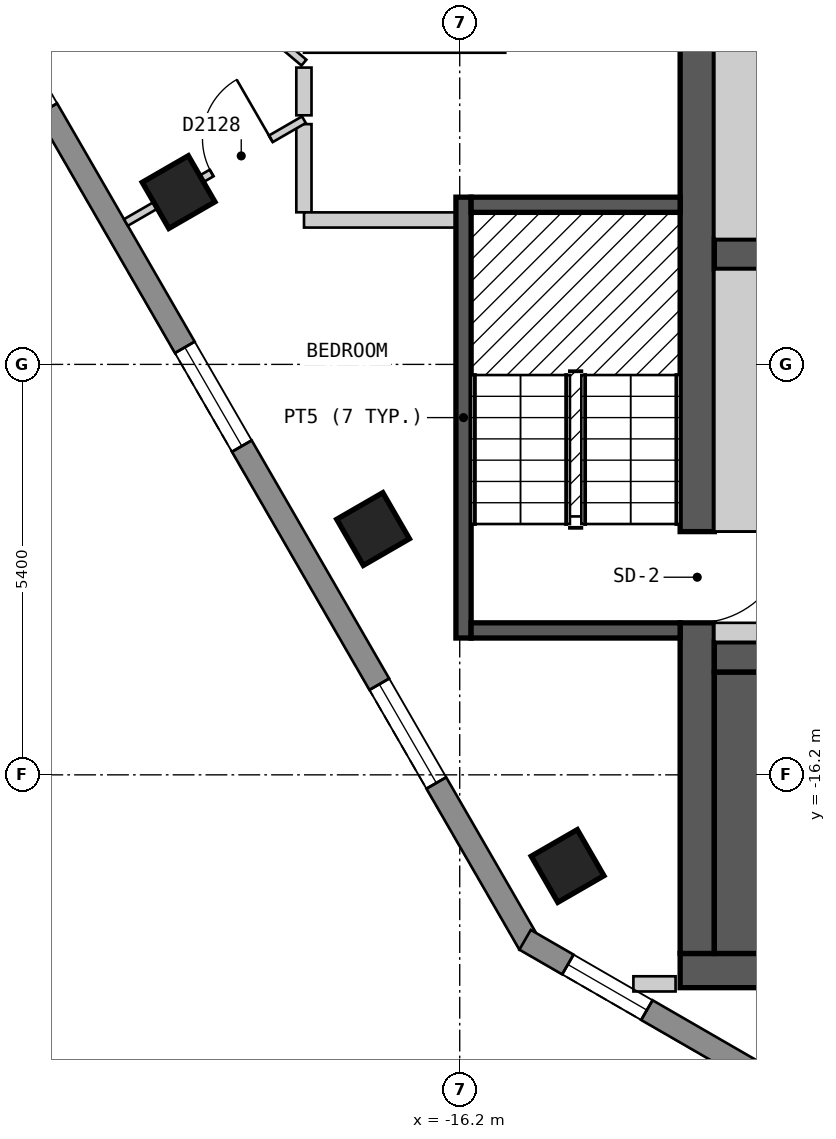
"""IFC4 building model, lengths in metres.
Left out: names, types, materials, properties, quantities, classifications, styles, units other than length and angle.
Written with IfcOpenShell. Run it as: python <this file> out.ifc"""

import sys

from ifc_helpers import new_model, si_unit, direction, frame, frame_2d, origin, origin_2d, place, context, subcontext, project, spatial, polyline, rectangle, outline, extrude, element, fill, save


model = new_model("IFC4")
c1 = context("Model", 3, precision=1e-05, world=origin(), true_north=direction((0.0, 1.0)))
c2 = subcontext(c1, "Body", "Model", "MODEL_VIEW")
j1 = project(units=[si_unit("LENGTHUNIT", "METRE"), si_unit("PLANEANGLEUNIT", "RADIAN")], contexts=[c1])
p1 = place(None, origin())
s1 = spatial("IfcSite", under=j1, at=p1, CompositionType="ELEMENT")
p2 = place(p1, origin())
s2 = spatial("IfcBuilding", under=s1, at=p2, CompositionType="ELEMENT")
p3 = place(p2, frame((0.0, 0.0, 205.8)))
s3 = spatial("IfcBuildingStorey", under=s2, at=p3, CompositionType="ELEMENT", Elevation=205.8)
for number, where, z_axis, x_axis in (
    (1, (-19.899, -8.533, 0.0), (0.0, 0.0, 1.0), (0.5, -0.866, 0.0)),
    (2, (-17.34, -12.966, 0.0), (0.0, 0.0, 1.0), (0.5, -0.866, 0.0)),
    (3, (-14.781, -17.399, 0.0), (0.0, 0.0, 1.0), (0.5, -0.866, 0.0)),
):
    element("IfcColumn", number, at=place(p3, frame(where, z_axis=z_axis, x_axis=x_axis)), inside=s3, PredefinedType="COLUMN", context=c2, shape_type="SweptSolid", body=[
        extrude(rectangle(XDim=0.7, YDim=0.7, at=origin_2d()), origin(), (0.0, 0.0, 1.0), 3.0),
    ])
p4 = place(p3, frame((-13.3, -18.775, 0.0), z_axis=(0.0, 0.0, 1.0), x_axis=(1.0, 0.0, 0.0)))
e4 = element("IfcWall", 4, at=p4, inside=s3, PredefinedType="SHEAR", context=c2, shape_type="SweptSolid", body=[
    extrude(rectangle(XDim=26.6, YDim=0.45, at=frame_2d((13.3, 0.0))), origin(), (0.0, 0.0, 1.0), 2.7),
])
p5 = place(p4, frame((9.8, 0.0, 0.0)))
e5 = element("IfcOpeningElement", 5, at=p5, cuts=e4, PredefinedType="OPENING", context=c2, shape_type="SweptSolid", body=[
    extrude(rectangle(XDim=0.9, YDim=2.1, at=frame_2d((0.45, 1.05))), frame((0.0, 0.235, 0.0), z_axis=(0.0, -1.0, 0.0), x_axis=(1.0, 0.0, 0.0)), (0.0, 0.0, 1.0), 0.47),
])
p6 = place(p3, frame((-13.075, -18.55, 0.0), z_axis=(0.0, 0.0, 1.0), x_axis=(0.0, 1.0, 0.0)))
e6 = element("IfcWall", 6, at=p6, inside=s3, PredefinedType="SHEAR", context=c2, shape_type="SweptSolid", body=[
    extrude(rectangle(XDim=13.1, YDim=0.45, at=frame_2d((6.55, 0.0))), origin(), (0.0, 0.0, 1.0), 2.7),
])
p7 = place(p6, frame((4.35, 0.0, 0.0)))
e7 = element("IfcOpeningElement", 7, at=p7, cuts=e6, PredefinedType="OPENING", context=c2, shape_type="SweptSolid", body=[
    extrude(rectangle(XDim=1.2, YDim=2.1, at=frame_2d((0.6, 1.05))), frame((0.0, 0.235, 0.0), z_axis=(0.0, -1.0, 0.0), x_axis=(1.0, 0.0, 0.0)), (0.0, 0.0, 1.0), 0.47),
])
p8 = place(p3, frame((-12.85, -14.65, 0.0), z_axis=(0.0, 0.0, 1.0), x_axis=(1.0, 0.0, 0.0)))
e8 = element("IfcWall", 8, at=p8, inside=s3, PredefinedType="SHEAR", context=c2, shape_type="SweptSolid", body=[
    extrude(rectangle(XDim=25.7, YDim=0.4, at=frame_2d((12.85, 0.0))), origin(), (0.0, 0.0, 1.0), 2.7),
])
p9 = place(p8, frame((2.05, 0.0, 0.0), z_axis=(0.0, 0.0, 1.0), x_axis=(-1.0, 0.0, 0.0)))
e9 = element("IfcOpeningElement", 9, at=p9, cuts=e8, PredefinedType="OPENING", context=c2, shape_type="SweptSolid", body=[
    extrude(rectangle(XDim=1.2, YDim=2.1, at=frame_2d((0.6, 1.05))), frame((0.0, 0.21, 0.0), z_axis=(0.0, -1.0, 0.0), x_axis=(1.0, 0.0, 0.0)), (0.0, 0.0, 1.0), 0.42),
])
p10 = place(p8, frame((24.9, 0.0, 0.0), z_axis=(0.0, 0.0, 1.0), x_axis=(-1.0, 0.0, 0.0)))
e10 = element("IfcOpeningElement", 10, at=p10, cuts=e8, PredefinedType="OPENING", context=c2, shape_type="SweptSolid", body=[
    extrude(rectangle(XDim=1.2, YDim=2.1, at=frame_2d((0.6, 1.05))), frame((0.0, 0.21, 0.0), z_axis=(0.0, -1.0, 0.0), x_axis=(1.0, 0.0, 0.0)), (0.0, 0.0, 1.0), 0.42),
])
p11 = place(p8, frame((7.95, 0.0, 0.0), z_axis=(0.0, 0.0, 1.0), x_axis=(-1.0, 0.0, 0.0)))
e11 = element("IfcOpeningElement", 11, at=p11, cuts=e8, PredefinedType="OPENING", context=c2, shape_type="SweptSolid", body=[
    extrude(rectangle(XDim=0.9, YDim=2.1, at=frame_2d((0.45, 1.05))), frame((0.0, 0.21, 0.0), z_axis=(0.0, -1.0, 0.0), x_axis=(1.0, 0.0, 0.0)), (0.0, 0.0, 1.0), 0.42),
])
p12 = place(p8, frame((10.0, 0.0, 0.0), z_axis=(0.0, 0.0, 1.0), x_axis=(-1.0, 0.0, 0.0)))
e12 = element("IfcOpeningElement", 12, at=p12, cuts=e8, PredefinedType="OPENING", context=c2, shape_type="SweptSolid", body=[
    extrude(rectangle(XDim=0.9, YDim=2.1, at=frame_2d((0.45, 1.05))), frame((0.0, 0.21, 0.0), z_axis=(0.0, -1.0, 0.0), x_axis=(1.0, 0.0, 0.0)), (0.0, 0.0, 1.0), 0.42),
])
p13 = place(p8, frame((12.3, 0.0, 0.0), z_axis=(0.0, 0.0, 1.0), x_axis=(-1.0, 0.0, 0.0)))
e13 = element("IfcOpeningElement", 13, at=p13, cuts=e8, PredefinedType="OPENING", context=c2, shape_type="SweptSolid", body=[
    extrude(rectangle(XDim=1.0, YDim=2.1, at=frame_2d((0.5, 1.05))), frame((0.0, 0.21, 0.0), z_axis=(0.0, -1.0, 0.0), x_axis=(1.0, 0.0, 0.0)), (0.0, 0.0, 1.0), 0.42),
])
p14 = place(p8, frame((14.5, 0.0, 0.0), z_axis=(0.0, 0.0, 1.0), x_axis=(-1.0, 0.0, 0.0)))
e14 = element("IfcOpeningElement", 14, at=p14, cuts=e8, PredefinedType="OPENING", context=c2, shape_type="SweptSolid", body=[
    extrude(rectangle(XDim=0.9, YDim=2.1, at=frame_2d((0.45, 1.05))), frame((0.0, 0.21, 0.0), z_axis=(0.0, -1.0, 0.0), x_axis=(1.0, 0.0, 0.0)), (0.0, 0.0, 1.0), 0.42),
])
p15 = place(p8, frame((16.5, 0.0, 0.0), z_axis=(0.0, 0.0, 1.0), x_axis=(-1.0, 0.0, 0.0)))
e15 = element("IfcOpeningElement", 15, at=p15, cuts=e8, PredefinedType="OPENING", context=c2, shape_type="SweptSolid", body=[
    extrude(rectangle(XDim=0.9, YDim=2.1, at=frame_2d((0.45, 1.05))), frame((0.0, 0.21, 0.0), z_axis=(0.0, -1.0, 0.0), x_axis=(1.0, 0.0, 0.0)), (0.0, 0.0, 1.0), 0.42),
])
p16 = place(p8, frame((18.65, 0.0, 0.0), z_axis=(0.0, 0.0, 1.0), x_axis=(-1.0, 0.0, 0.0)))
e16 = element("IfcOpeningElement", 16, at=p16, cuts=e8, PredefinedType="OPENING", context=c2, shape_type="SweptSolid", body=[
    extrude(rectangle(XDim=1.0, YDim=2.1, at=frame_2d((0.5, 1.05))), frame((0.0, 0.21, 0.0), z_axis=(0.0, -1.0, 0.0), x_axis=(1.0, 0.0, 0.0)), (0.0, 0.0, 1.0), 0.42),
])
p17 = place(p3, frame((-12.85, -9.35, 0.0), z_axis=(0.0, 0.0, 1.0), x_axis=(1.0, 0.0, 0.0)))
e17 = element("IfcWall", 17, at=p17, inside=s3, PredefinedType="SHEAR", context=c2, shape_type="SweptSolid", body=[
    extrude(rectangle(XDim=23.05, YDim=0.4, at=frame_2d((11.525, 0.0))), origin(), (0.0, 0.0, 1.0), 2.7),
])
p18 = place(p17, frame((1.45, 0.0, 0.0)))
e18 = element("IfcOpeningElement", 18, at=p18, cuts=e17, PredefinedType="OPENING", context=c2, shape_type="SweptSolid", body=[
    extrude(rectangle(XDim=1.1, YDim=2.1, at=frame_2d((0.55, 1.05))), frame((0.0, 0.21, 0.0), z_axis=(0.0, -1.0, 0.0), x_axis=(1.0, 0.0, 0.0)), (0.0, 0.0, 1.0), 0.42),
])
p19 = place(p17, frame((4.25, 0.0, 0.0)))
e19 = element("IfcOpeningElement", 19, at=p19, cuts=e17, PredefinedType="OPENING", context=c2, shape_type="SweptSolid", body=[
    extrude(rectangle(XDim=1.1, YDim=2.1, at=frame_2d((0.55, 1.05))), frame((0.0, 0.21, 0.0), z_axis=(0.0, -1.0, 0.0), x_axis=(1.0, 0.0, 0.0)), (0.0, 0.0, 1.0), 0.42),
])
p20 = place(p17, frame((7.05, 0.0, 0.0)))
e20 = element("IfcOpeningElement", 20, at=p20, cuts=e17, PredefinedType="OPENING", context=c2, shape_type="SweptSolid", body=[
    extrude(rectangle(XDim=1.1, YDim=2.1, at=frame_2d((0.55, 1.05))), frame((0.0, 0.21, 0.0), z_axis=(0.0, -1.0, 0.0), x_axis=(1.0, 0.0, 0.0)), (0.0, 0.0, 1.0), 0.42),
])
p21 = place(p17, frame((9.35, 0.0, 0.0)))
e21 = element("IfcOpeningElement", 21, at=p21, cuts=e17, PredefinedType="OPENING", context=c2, shape_type="SweptSolid", body=[
    extrude(rectangle(XDim=1.1, YDim=2.1, at=frame_2d((0.55, 1.05))), frame((0.0, 0.21, 0.0), z_axis=(0.0, -1.0, 0.0), x_axis=(1.0, 0.0, 0.0)), (0.0, 0.0, 1.0), 0.42),
])
p22 = place(p17, frame((11.65, 0.0, 0.0)))
e22 = element("IfcOpeningElement", 22, at=p22, cuts=e17, PredefinedType="OPENING", context=c2, shape_type="SweptSolid", body=[
    extrude(rectangle(XDim=1.1, YDim=2.1, at=frame_2d((0.55, 1.05))), frame((0.0, 0.21, 0.0), z_axis=(0.0, -1.0, 0.0), x_axis=(1.0, 0.0, 0.0)), (0.0, 0.0, 1.0), 0.42),
])
p23 = place(p17, frame((13.95, 0.0, 0.0)))
e23 = element("IfcOpeningElement", 23, at=p23, cuts=e17, PredefinedType="OPENING", context=c2, shape_type="SweptSolid", body=[
    extrude(rectangle(XDim=1.1, YDim=2.1, at=frame_2d((0.55, 1.05))), frame((0.0, 0.21, 0.0), z_axis=(0.0, -1.0, 0.0), x_axis=(1.0, 0.0, 0.0)), (0.0, 0.0, 1.0), 0.42),
])
p24 = place(p17, frame((16.25, 0.0, 0.0)))
e24 = element("IfcOpeningElement", 24, at=p24, cuts=e17, PredefinedType="OPENING", context=c2, shape_type="SweptSolid", body=[
    extrude(rectangle(XDim=1.1, YDim=2.1, at=frame_2d((0.55, 1.05))), frame((0.0, 0.21, 0.0), z_axis=(0.0, -1.0, 0.0), x_axis=(1.0, 0.0, 0.0)), (0.0, 0.0, 1.0), 0.42),
])
p25 = place(p17, frame((18.55, 0.0, 0.0)))
e25 = element("IfcOpeningElement", 25, at=p25, cuts=e17, PredefinedType="OPENING", context=c2, shape_type="SweptSolid", body=[
    extrude(rectangle(XDim=1.1, YDim=2.1, at=frame_2d((0.55, 1.05))), frame((0.0, 0.21, 0.0), z_axis=(0.0, -1.0, 0.0), x_axis=(1.0, 0.0, 0.0)), (0.0, 0.0, 1.0), 0.42),
])
p26 = place(p17, frame((20.95, 0.0, 0.0)))
e26 = element("IfcOpeningElement", 26, at=p26, cuts=e17, PredefinedType="OPENING", context=c2, shape_type="SweptSolid", body=[
    extrude(rectangle(XDim=1.1, YDim=2.1, at=frame_2d((0.55, 1.05))), frame((0.0, 0.21, 0.0), z_axis=(0.0, -1.0, 0.0), x_axis=(1.0, 0.0, 0.0)), (0.0, 0.0, 1.0), 0.42),
])
p27 = place(p3, frame((-23.599, -4.025, 0.0), z_axis=(0.0, 0.0, 1.0), x_axis=(0.500012653391, -0.866018098222, 0.0)))
e27 = element("IfcWall", 27, at=p27, inside=s3, PredefinedType="SOLIDWALL", context=c2, shape_type="SweptSolid", body=[
    extrude(outline(polyline([(0.0, -0.15), (16.628, -0.15), (16.548, 0.15), (0.08, 0.15), (0.0, -0.15)])), origin(), (0.0, 0.0, 1.0), 2.7),
])
p28 = place(p27, frame((2.444, 0.0, 0.15)))
e28 = element("IfcOpeningElement", 28, at=p28, cuts=e27, PredefinedType="OPENING", context=c2, shape_type="SweptSolid", body=[
    extrude(rectangle(XDim=1.5, YDim=2.1, at=frame_2d((0.75, 1.05))), frame((0.0, 0.16, 0.0), z_axis=(0.0, -1.0, 0.0), x_axis=(1.0, 0.0, 0.0)), (0.0, 0.0, 1.0), 0.32),
])
p29 = place(p27, frame((7.564, 0.0, 0.15)))
e29 = element("IfcOpeningElement", 29, at=p29, cuts=e27, PredefinedType="OPENING", context=c2, shape_type="SweptSolid", body=[
    extrude(rectangle(XDim=1.5, YDim=2.1, at=frame_2d((0.75, 1.05))), frame((0.0, 0.16, 0.0), z_axis=(0.0, -1.0, 0.0), x_axis=(1.0, 0.0, 0.0)), (0.0, 0.0, 1.0), 0.32),
])
p30 = place(p27, frame((12.682, 0.0, 0.15)))
e30 = element("IfcOpeningElement", 30, at=p30, cuts=e27, PredefinedType="OPENING", context=c2, shape_type="SweptSolid", body=[
    extrude(rectangle(XDim=1.5, YDim=2.1, at=frame_2d((0.75, 1.05))), frame((0.0, 0.16, 0.0), z_axis=(0.0, -1.0, 0.0), x_axis=(1.0, 0.0, 0.0)), (0.0, 0.0, 1.0), 0.32),
])
p31 = place(p3, frame((-15.34, -18.37, 0.0), z_axis=(0.0, 0.0, 1.0), x_axis=(0.866022959057, -0.500004234368, 0.0)))
e31 = element("IfcWall", 31, at=p31, inside=s3, PredefinedType="SOLIDWALL", context=c2, shape_type="SweptSolid", body=[
    extrude(outline(polyline([(0.0, -0.15), (5.0, -0.15), (4.92, 0.15), (0.08, 0.15), (0.0, -0.15)])), origin(), (0.0, 0.0, 1.0), 2.7),
])
p32 = place(p31, frame((0.65, 0.0, 0.15)))
e32 = element("IfcOpeningElement", 32, at=p32, cuts=e31, PredefinedType="OPENING", context=c2, shape_type="SweptSolid", body=[
    extrude(rectangle(XDim=1.2, YDim=2.1, at=frame_2d((0.6, 1.05))), frame((0.0, 0.16, 0.0), z_axis=(0.0, -1.0, 0.0), x_axis=(1.0, 0.0, 0.0)), (0.0, 0.0, 1.0), 0.32),
])
p33 = place(p3, frame((-18.25, -7.639, 0.0), z_axis=(0.0, 0.0, 1.0), x_axis=(0.0, -1.0, 0.0)))
e33 = element("IfcWall", 33, at=p33, inside=s3, PredefinedType="PARTITIONING", context=c2, shape_type="SweptSolid", body=[
    extrude(rectangle(XDim=1.16, YDim=0.2, at=frame_2d((0.58, 0.0))), origin(), (0.0, 0.0, 1.0), 2.7),
])
p34 = place(p3, frame((-18.249, -6.6, 0.0), z_axis=(0.0, 0.0, 1.0), x_axis=(1.0, 0.0, 0.0)))
e34 = element("IfcWall", 34, at=p34, inside=s3, PredefinedType="PARTITIONING", context=c2, shape_type="SweptSolid", body=[
    extrude(rectangle(XDim=2.648, YDim=0.2, at=frame_2d((1.324, 0.0))), origin(), (0.0, 0.0, 1.0), 2.7),
])
p35 = place(p3, frame((-18.249, -8.9, 0.0), z_axis=(0.0, 0.0, 1.0), x_axis=(1.0, 0.0, 0.0)))
e35 = element("IfcWall", 35, at=p35, inside=s3, PredefinedType="PARTITIONING", context=c2, shape_type="SweptSolid", body=[
    extrude(rectangle(XDim=2.199, YDim=0.2, at=frame_2d((1.1, 0.0))), origin(), (0.0, 0.0, 1.0), 2.7),
])
p36 = place(p3, frame((-18.25, -7.523, 0.0), z_axis=(0.0, 0.0, 1.0), x_axis=(0.0, 1.0, 0.0)))
e36 = element("IfcWall", 36, at=p36, inside=s3, PredefinedType="PARTITIONING", context=c2, shape_type="SweptSolid", body=[
    extrude(rectangle(XDim=0.628, YDim=0.2, at=frame_2d((0.314, 0.0))), origin(), (0.0, 0.0, 1.0), 2.7),
])
p37 = place(p3, frame((-20.15, -5.223, 0.0), z_axis=(0.0, 0.0, 1.0), x_axis=(0.763471868926, -0.645841083672, 0.0)))
e37 = element("IfcWall", 37, at=p37, inside=s3, PredefinedType="PARTITIONING", context=c2, shape_type="SweptSolid", body=[
    extrude(rectangle(XDim=2.489, YDim=0.1, at=frame_2d((1.244, 0.0))), origin(), (0.0, 0.0, 1.0), 2.7),
])
p38 = place(p3, frame((-20.592, -8.933, 0.0), z_axis=(0.0, 0.0, 1.0), x_axis=(0.866045775131, 0.499964714133, 0.0)))
e38 = element("IfcWall", 38, at=p38, inside=s3, PredefinedType="PARTITIONING", context=c2, shape_type="SweptSolid", body=[
    extrude(rectangle(XDim=2.704, YDim=0.1, at=frame_2d((1.352, 0.0))), origin(), (0.0, 0.0, 1.0), 2.7),
])
p39 = place(p38, frame((1.302, 0.0, 0.0)))
e39 = element("IfcOpeningElement", 39, at=p39, cuts=e38, PredefinedType="OPENING", context=c2, shape_type="SweptSolid", body=[
    extrude(rectangle(XDim=0.9, YDim=2.1, at=frame_2d((0.45, 1.05))), frame((0.0, 0.06, 0.0), z_axis=(0.0, -1.0, 0.0), x_axis=(1.0, 0.0, 0.0)), (0.0, 0.0, 1.0), 0.12),
])
p40 = place(p3, frame((-13.915, -18.95, 0.0), z_axis=(0.0, 0.0, 1.0), x_axis=(1.0, 0.0, 0.0)))
e40 = element("IfcWall", 40, at=p40, inside=s3, PredefinedType="PARTITIONING", context=c2, shape_type="SweptSolid", body=[
    extrude(rectangle(XDim=0.555, YDim=0.2, at=frame_2d((0.277, 0.0))), origin(), (0.0, 0.0, 1.0), 2.7),
])
p41 = place(p3, frame((-16.15, -14.4, 0.0), z_axis=(0.0, 0.0, 1.0), x_axis=(0.0, 1.0, 0.0)))
e41 = element("IfcWall", 41, at=p41, inside=s3, PredefinedType="SOLIDWALL", context=c2, shape_type="SweptSolid", body=[
    extrude(rectangle(XDim=5.8, YDim=0.2, at=frame_2d((2.9, 0.0))), origin(), (0.0, 0.0, 1.0), 2.7),
])
for number, where, z_axis, x_axis in (
    (42, (-16.05, -14.3, 0.0), (0.0, 0.0, 1.0), (1.0, 0.0, 0.0)),
    (43, (-16.05, -8.7, 0.0), (0.0, 0.0, 1.0), (1.0, 0.0, 0.0)),
):
    element("IfcWall", number, at=place(p3, frame(where, z_axis=z_axis, x_axis=x_axis)), inside=s3, PredefinedType="SOLIDWALL", context=c2, shape_type="SweptSolid", body=[
        extrude(rectangle(XDim=2.75, YDim=0.2, at=frame_2d((1.375, 0.0))), origin(), (0.0, 0.0, 1.0), 2.7),
    ])
p42 = place(p3, frame((-12.475, -18.55, 0.0), z_axis=(0.0, 0.0, 1.0), x_axis=(0.0, 1.0, 0.0)))
e44 = element("IfcWall", 44, at=p42, inside=s3, PredefinedType="SOLIDWALL", context=c2, shape_type="SweptSolid", body=[
    extrude(rectangle(XDim=3.7, YDim=0.75, at=frame_2d((1.85, 0.0))), origin(), (0.0, 0.0, 1.0), 2.7),
])
p43 = place(p3, frame((-12.85, -14.325, 0.0), z_axis=(0.0, 0.0, 1.0), x_axis=(1.0, 0.0, 0.0)))
e45 = element("IfcWall", 45, at=p43, inside=s3, PredefinedType="PARTITIONING", context=c2, shape_type="SweptSolid", body=[
    extrude(rectangle(XDim=0.75, YDim=0.25, at=frame_2d((0.375, 0.0))), origin(), (0.0, 0.0, 1.0), 2.7),
])
p44 = place(p3, frame((-12.475, -13.0, 0.0), z_axis=(0.0, 0.0, 1.0), x_axis=(0.0, 1.0, 0.0)))
e46 = element("IfcWall", 46, at=p44, inside=s3, PredefinedType="PARTITIONING", context=c2, shape_type="SweptSolid", body=[
    extrude(rectangle(XDim=3.45, YDim=0.75, at=frame_2d((1.725, 0.0))), origin(), (0.0, 0.0, 1.0), 2.7),
])
p45 = place(p3, frame((-12.475, -9.15, 0.0), z_axis=(0.0, 0.0, 1.0), x_axis=(0.0, 1.0, 0.0)))
e47 = element("IfcWall", 47, at=p45, inside=s3, PredefinedType="SOLIDWALL", context=c2, shape_type="SweptSolid", body=[
    extrude(rectangle(XDim=3.7, YDim=0.75, at=frame_2d((1.85, 0.0))), origin(), (0.0, 0.0, 1.0), 2.7),
])
p46 = place(p29, origin())
e48 = element("IfcWindow", 48, at=p46, inside=s3, PartitioningType="SINGLE_PANEL", PredefinedType="WINDOW", context=c2, shape_type="SweptSolid", body=[
    extrude(rectangle(XDim=1.5, YDim=2.1, at=frame_2d((0.75, 1.05))), frame((0.0, 0.03, 0.0), z_axis=(0.0, -1.0, 0.0), x_axis=(1.0, 0.0, 0.0)), (0.0, 0.0, 1.0), 0.06),
])
fill(e29, e48)
p47 = place(p30, origin())
e49 = element("IfcWindow", 49, at=p47, inside=s3, PartitioningType="SINGLE_PANEL", PredefinedType="WINDOW", context=c2, shape_type="SweptSolid", body=[
    extrude(rectangle(XDim=1.5, YDim=2.1, at=frame_2d((0.75, 1.05))), frame((0.0, 0.03, 0.0), z_axis=(0.0, -1.0, 0.0), x_axis=(1.0, 0.0, 0.0)), (0.0, 0.0, 1.0), 0.06),
])
fill(e30, e49)
p48 = place(p32, origin())
e50 = element("IfcWindow", 50, at=p48, inside=s3, PartitioningType="SINGLE_PANEL", PredefinedType="WINDOW", context=c2, shape_type="SweptSolid", body=[
    extrude(rectangle(XDim=1.2, YDim=2.1, at=frame_2d((0.6, 1.05))), frame((0.0, 0.03, 0.0), z_axis=(0.0, -1.0, 0.0), x_axis=(1.0, 0.0, 0.0)), (0.0, 0.0, 1.0), 0.06),
])
fill(e32, e50)
p49 = place(p39, origin())
e51 = element("IfcDoor", 51, at=p49, inside=s3, OperationType="SINGLE_SWING_RIGHT", PredefinedType="DOOR", context=c2, shape_type="SweptSolid", body=[
    extrude(rectangle(XDim=0.9, YDim=2.1, at=frame_2d((0.45, 1.05))), frame((0.0, 0.025, 0.0), z_axis=(0.0, -1.0, 0.0), x_axis=(1.0, 0.0, 0.0)), (0.0, 0.0, 1.0), 0.05),
])
fill(e39, e51)
p50 = place(p7, origin())
e52 = element("IfcDoor", 52, at=p50, inside=s3, OperationType="SINGLE_SWING_RIGHT", PredefinedType="DOOR", context=c2, shape_type="SweptSolid", body=[
    extrude(rectangle(XDim=1.2, YDim=2.1, at=frame_2d((0.6, 1.05))), frame((0.0, 0.025, 0.0), z_axis=(0.0, -1.0, 0.0), x_axis=(1.0, 0.0, 0.0)), (0.0, 0.0, 1.0), 0.05),
])
fill(e7, e52)
save(model, sys.argv[1])
